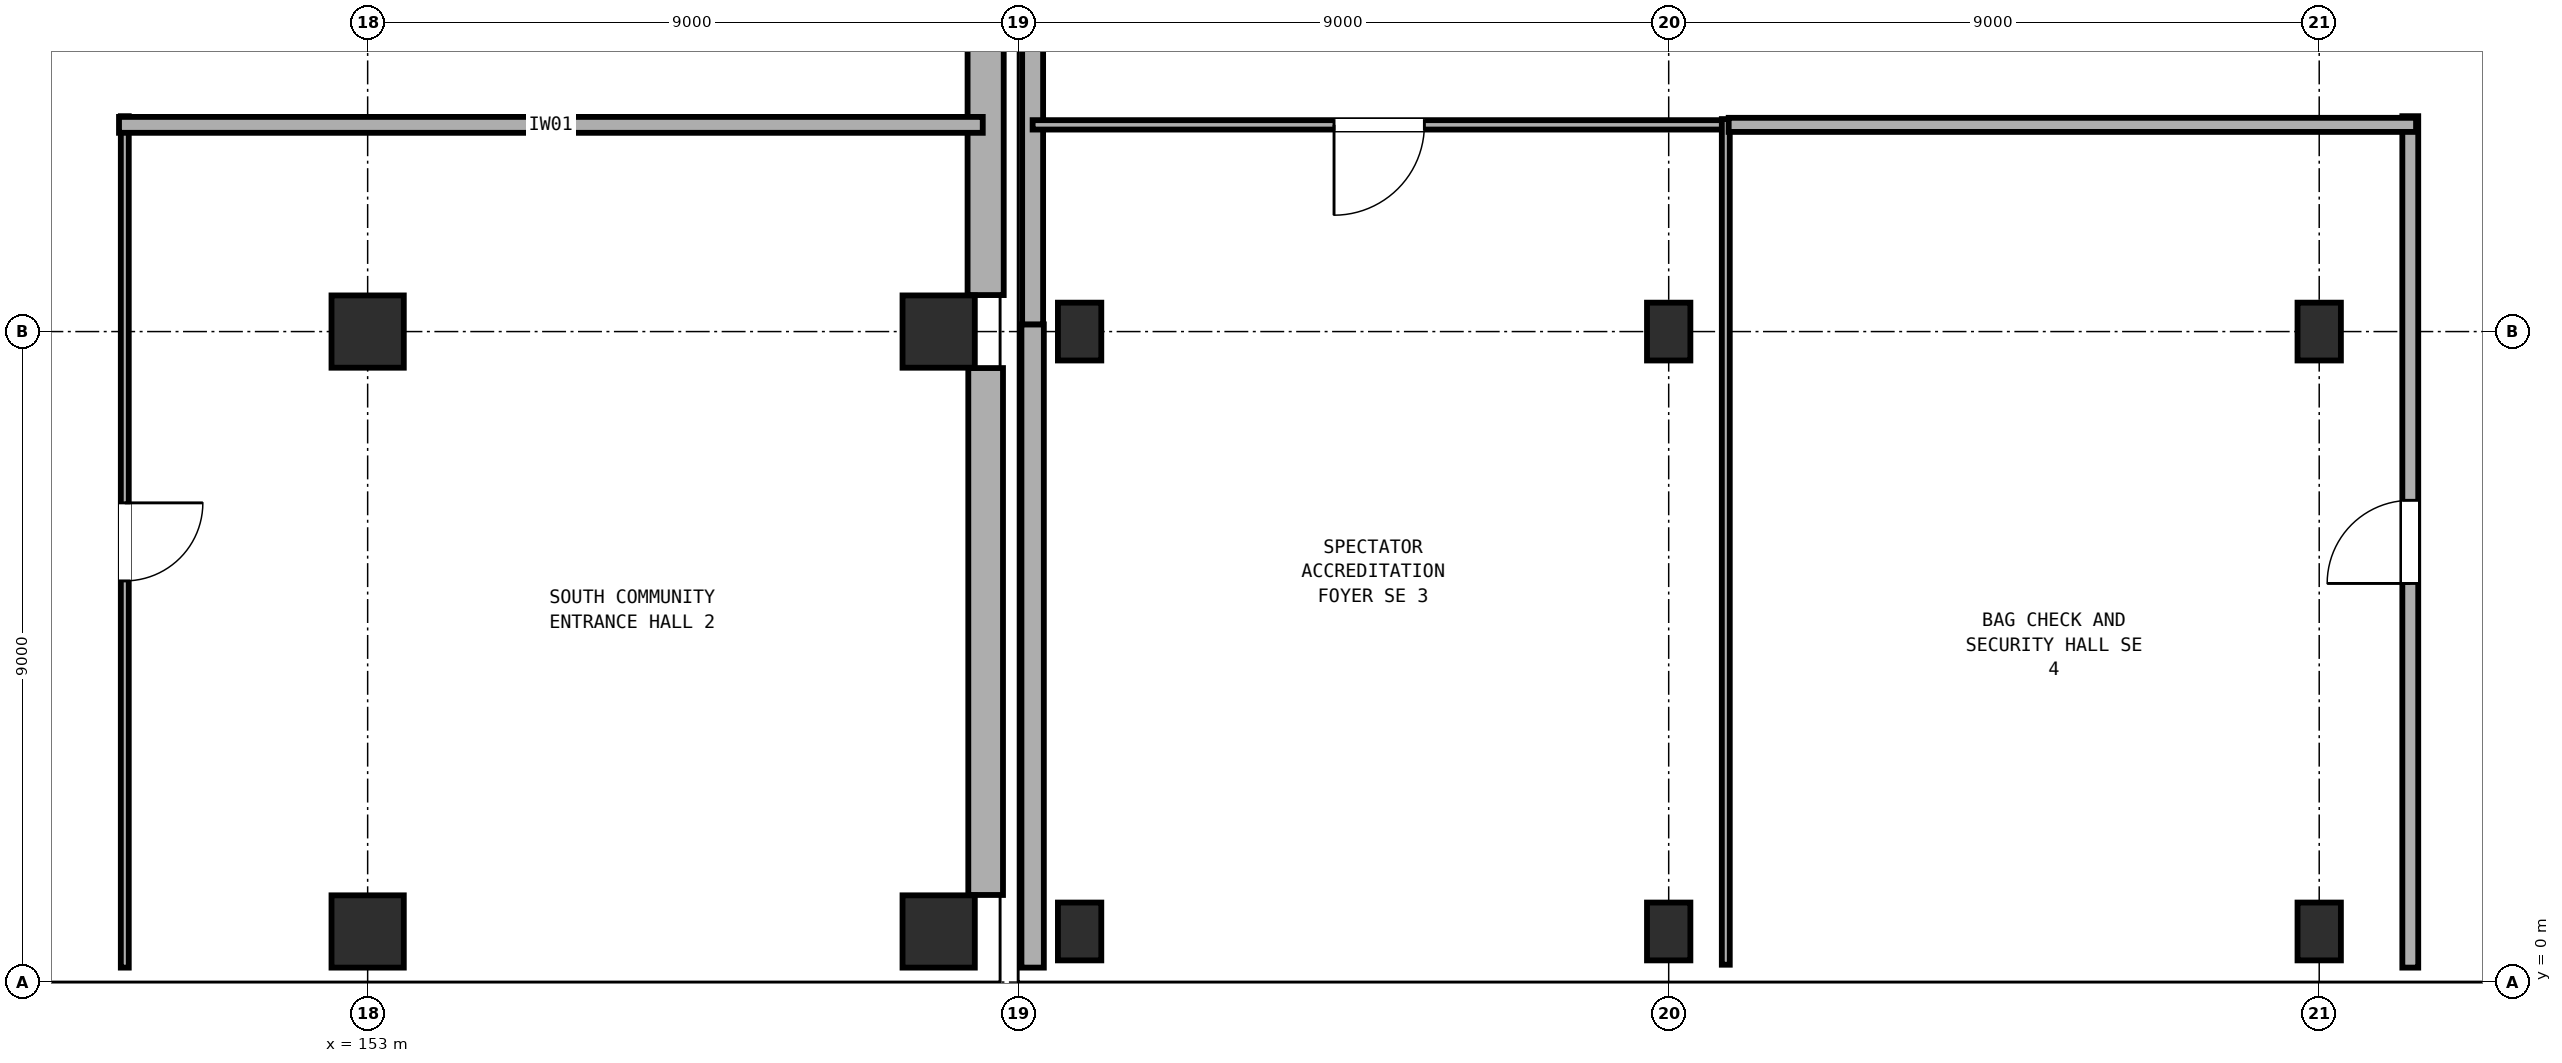
"""IFC4 building model, lengths in metres.
Left out: names, types, materials, properties, quantities, classifications, styles, units other than length and angle.
Written with IfcOpenShell. Run it as: python <this file> out.ifc"""

import sys

from ifc_helpers import new_model, si_unit, direction, frame, frame_2d, origin, origin_2d, place, context, subcontext, project, spatial, rectangle, extrude, element, fill, save


model = new_model("IFC4")
c1 = context("Model", 3, precision=1e-05, world=origin(), true_north=direction((0.0, 1.0)))
c2 = subcontext(c1, "Body", "Model", "MODEL_VIEW")
j1 = project(units=[si_unit("LENGTHUNIT", "METRE"), si_unit("PLANEANGLEUNIT", "RADIAN")], contexts=[c1])
p1 = place(None, origin())
s1 = spatial("IfcSite", under=j1, at=p1, CompositionType="ELEMENT")
p2 = place(p1, origin())
s2 = spatial("IfcBuilding", under=s1, at=p2, CompositionType="ELEMENT")
p3 = place(p2, origin())
s3 = spatial("IfcBuildingStorey", under=s2, at=p3, CompositionType="ELEMENT", Elevation=0.0)
for number, where, z_axis, x_axis in (
    (1, (153.0, 0.7, 0.0), (0.0, 0.0, 1.0), (1.0, 0.0, 0.0)),
    (2, (153.0, 9.0, 0.0), (0.0, 0.0, 1.0), (1.0, 0.0, 0.0)),
    (3, (160.9, 0.7, 0.0), (0.0, 0.0, 1.0), (1.0, 0.0, 0.0)),
    (4, (160.9, 9.0, 0.0), (0.0, 0.0, 1.0), (1.0, 0.0, 0.0)),
):
    element("IfcColumn", number, at=place(p3, frame(where, z_axis=z_axis, x_axis=x_axis)), inside=s3, PredefinedType="COLUMN", context=c2, shape_type="SweptSolid", body=[
        extrude(rectangle(XDim=1.0, YDim=1.0, at=origin_2d()), origin(), (0.0, 0.0, 1.0), 4.8),
    ])
for number, where, z_axis, x_axis in (
    (5, (162.85, 0.7, 0.0), (0.0, 0.0, 1.0), (1.0, 0.0, 0.0)),
    (6, (162.85, 9.0, 0.0), (0.0, 0.0, 1.0), (1.0, 0.0, 0.0)),
    (7, (171.0, 0.7, 0.0), (0.0, 0.0, 1.0), (1.0, 0.0, 0.0)),
    (8, (171.0, 9.0, 0.0), (0.0, 0.0, 1.0), (1.0, 0.0, 0.0)),
    (9, (180.0, 0.7, 0.0), (0.0, 0.0, 1.0), (1.0, 0.0, 0.0)),
    (10, (180.0, 9.0, 0.0), (0.0, 0.0, 1.0), (1.0, 0.0, 0.0)),
):
    element("IfcColumn", number, at=place(p3, frame(where, z_axis=z_axis, x_axis=x_axis)), inside=s3, PredefinedType="COLUMN", context=c2, shape_type="SweptSolid", body=[
        extrude(rectangle(XDim=0.6, YDim=0.8, at=origin_2d()), origin(), (0.0, 0.0, 1.0), 4.8),
    ])
p4 = place(p3, frame((161.55, 17.495, 0.0), z_axis=(0.0, 0.0, 1.0), x_axis=(0.0, -1.0, 0.0)))
e11 = element("IfcWall", 11, at=p4, inside=s3, PredefinedType="SOLIDWALL", context=c2, shape_type="SweptSolid", body=[
    extrude(rectangle(XDim=7.99, YDim=0.5, at=frame_2d((3.995, 0.0))), origin(), (0.0, 0.0, 1.0), 3.28),
])
p5 = place(p3, frame((161.55, 8.495, 0.0), z_axis=(0.0, 0.0, 1.0), x_axis=(0.0, -1.0, 0.0)))
e12 = element("IfcWall", 12, at=p5, inside=s3, PredefinedType="SOLIDWALL", context=c2, shape_type="SweptSolid", body=[
    extrude(rectangle(XDim=7.29, YDim=0.48, at=frame_2d((3.645, 0.0))), origin(), (0.0, 0.0, 1.0), 3.28),
])
p6 = place(p3, frame((160.395, 0.2, 0.0), z_axis=(0.0, 0.0, 1.0), x_axis=(-1.0, 0.0, 0.0)))
e13 = element("IfcWall", 13, at=p6, inside=s3, PredefinedType="SOLIDWALL", context=c2, shape_type="SweptSolid", body=[
    extrude(rectangle(XDim=6.89, YDim=0.31, at=frame_2d((3.445, 0.0))), origin(), (0.0, 0.0, 1.0), 3.58),
])
p7 = place(p6, frame((1.895, 0.0, 0.0)))
e14 = element("IfcOpeningElement", 14, at=p7, cuts=e13, PredefinedType="OPENING", context=c2, shape_type="SweptSolid", body=[
    extrude(rectangle(XDim=3.1, YDim=2.5, at=frame_2d((1.55, 1.25))), frame((0.0, 0.165, 0.0), z_axis=(0.0, -1.0, 0.0), x_axis=(1.0, 0.0, 0.0)), (0.0, 0.0, 1.0), 0.33),
])
p8 = place(p3, frame((152.495, 0.2, 0.0), z_axis=(0.0, 0.0, 1.0), x_axis=(-1.0, 0.0, 0.0)))
e15 = element("IfcWall", 15, at=p8, inside=s3, PredefinedType="SOLIDWALL", context=c2, shape_type="SweptSolid", body=[
    extrude(rectangle(XDim=7.99, YDim=0.29, at=frame_2d((3.995, 0.0))), origin(), (0.0, 0.0, 1.0), 3.58),
])
p9 = place(p8, frame((3.295, 0.0, 0.0)))
e16 = element("IfcOpeningElement", 16, at=p9, cuts=e15, PredefinedType="OPENING", context=c2, shape_type="SweptSolid", body=[
    extrude(rectangle(XDim=3.6, YDim=2.6, at=frame_2d((1.8, 1.3))), frame((0.0, 0.155, 0.0), z_axis=(0.0, -1.0, 0.0), x_axis=(1.0, 0.0, 0.0)), (0.0, 0.0, 1.0), 0.31),
])
p10 = place(p3, frame((162.2, 0.2, 0.0), z_axis=(0.0, 0.0, 1.0), x_axis=(0.0, 1.0, 0.0)))
e17 = element("IfcWall", 17, at=p10, inside=s3, PredefinedType="SOLIDWALL", context=c2, shape_type="SweptSolid", body=[
    extrude(rectangle(XDim=8.9, YDim=0.31, at=frame_2d((4.45, 0.0))), origin(), (0.0, 0.0, 1.0), 3.28),
])
p11 = place(p3, frame((162.2, 9.1, 0.0), z_axis=(0.0, 0.0, 1.0), x_axis=(0.0, 1.0, 0.0)))
e18 = element("IfcWall", 18, at=p11, inside=s3, PredefinedType="SOLIDWALL", context=c2, shape_type="SweptSolid", body=[
    extrude(rectangle(XDim=8.9, YDim=0.29, at=frame_2d((4.45, 0.0))), origin(), (0.0, 0.0, 1.0), 3.28),
])
p12 = place(p3, frame((188.695, 0.2, 0.0), z_axis=(0.0, 0.0, 1.0), x_axis=(-1.0, 0.0, 0.0)))
e19 = element("IfcWall", 19, at=p12, inside=s3, PredefinedType="SOLIDWALL", context=c2, shape_type="SweptSolid", body=[
    extrude(rectangle(XDim=8.39, YDim=0.29, at=frame_2d((4.195, 0.0))), origin(), (0.0, 0.0, 1.0), 3.58),
])
p13 = place(p12, frame((3.545, 0.0, 0.0)))
e20 = element("IfcOpeningElement", 20, at=p13, cuts=e19, PredefinedType="OPENING", context=c2, shape_type="SweptSolid", body=[
    extrude(rectangle(XDim=3.3, YDim=2.55, at=frame_2d((1.65, 1.275))), frame((0.0, 0.155, 0.0), z_axis=(0.0, -1.0, 0.0), x_axis=(1.0, 0.0, 0.0)), (0.0, 0.0, 1.0), 0.31),
])
p14 = place(p3, frame((179.695, 0.2, 0.0), z_axis=(0.0, 0.0, 1.0), x_axis=(-1.0, 0.0, 0.0)))
e21 = element("IfcWall", 21, at=p14, inside=s3, PredefinedType="SOLIDWALL", context=c2, shape_type="SweptSolid", body=[
    extrude(rectangle(XDim=8.39, YDim=0.5, at=frame_2d((4.195, 0.0))), origin(), (0.0, 0.0, 1.0), 3.28),
])
p15 = place(p14, frame((2.895, 0.0, 0.0)))
e22 = element("IfcOpeningElement", 22, at=p15, cuts=e21, PredefinedType="OPENING", context=c2, shape_type="SweptSolid", body=[
    extrude(rectangle(XDim=2.6, YDim=2.35, at=frame_2d((1.3, 1.175))), frame((0.0, 0.26, 0.0), z_axis=(0.0, -1.0, 0.0), x_axis=(1.0, 0.0, 0.0)), (0.0, 0.0, 1.0), 0.52),
])
p16 = place(p3, frame((170.695, 0.2, 0.0), z_axis=(0.0, 0.0, 1.0), x_axis=(-1.0, 0.0, 0.0)))
e23 = element("IfcWall", 23, at=p16, inside=s3, PredefinedType="SOLIDWALL", context=c2, shape_type="SweptSolid", body=[
    extrude(rectangle(XDim=7.54, YDim=0.48, at=frame_2d((3.77, 0.0))), origin(), (0.0, 0.0, 1.0), 3.28),
])
p17 = place(p16, frame((2.52, 0.0, 0.0)))
e24 = element("IfcOpeningElement", 24, at=p17, cuts=e23, PredefinedType="OPENING", context=c2, shape_type="SweptSolid", body=[
    extrude(rectangle(XDim=2.5, YDim=2.35, at=frame_2d((1.25, 1.175))), frame((0.0, 0.25, 0.0), z_axis=(0.0, -1.0, 0.0), x_axis=(1.0, 0.0, 0.0)), (0.0, 0.0, 1.0), 0.5),
])
p18 = place(p3, frame((149.64, 11.98, 0.0), z_axis=(0.0, 0.0, 1.0), x_axis=(0.0, -1.0, 0.0)))
e25 = element("IfcWall", 25, at=p18, inside=s3, PredefinedType="PARTITIONING", context=c2, shape_type="SweptSolid", body=[
    extrude(rectangle(XDim=11.78, YDim=0.11, at=frame_2d((5.89, 0.0))), origin(), (0.0, 0.0, 1.0), 3.28),
])
p19 = place(p18, frame((5.35, 0.0, 0.0)))
e26 = element("IfcOpeningElement", 26, at=p19, cuts=e25, PredefinedType="OPENING", context=c2, shape_type="SweptSolid", body=[
    extrude(rectangle(XDim=1.08, YDim=2.18, at=frame_2d((0.54, 1.09))), frame((0.0, 0.065, 0.0), z_axis=(0.0, -1.0, 0.0), x_axis=(1.0, 0.0, 0.0)), (0.0, 0.0, 1.0), 0.13),
])
p20 = place(p3, frame((149.56, 11.86, 0.0), z_axis=(0.0, 0.0, 1.0), x_axis=(1.0, 0.0, 0.0)))
e27 = element("IfcWall", 27, at=p20, inside=s3, PredefinedType="PARTITIONING", context=c2, shape_type="SweptSolid", body=[
    extrude(rectangle(XDim=11.95, YDim=0.22, at=frame_2d((5.975, 0.0))), origin(), (0.0, 0.0, 1.0), 3.28),
])
p21 = place(p3, frame((171.79, 11.86, 0.0), z_axis=(0.0, 0.0, 1.0), x_axis=(-1.0, 0.0, 0.0)))
e28 = element("IfcWall", 28, at=p21, inside=s3, PredefinedType="PARTITIONING", context=c2, shape_type="SweptSolid", body=[
    extrude(rectangle(XDim=9.59, YDim=0.13, at=frame_2d((4.795, 0.0))), origin(), (0.0, 0.0, 1.0), 3.28),
])
p22 = place(p21, frame((4.17, 0.0, 0.0)))
e29 = element("IfcOpeningElement", 29, at=p22, cuts=e28, PredefinedType="OPENING", context=c2, shape_type="SweptSolid", body=[
    extrude(rectangle(XDim=1.25, YDim=2.15, at=frame_2d((0.625, 1.075))), frame((0.0, 0.075, 0.0), z_axis=(0.0, -1.0, 0.0), x_axis=(1.0, 0.0, 0.0)), (0.0, 0.0, 1.0), 0.15),
])
p23 = place(p3, frame((171.79, 11.94, 0.0), z_axis=(0.0, 0.0, 1.0), x_axis=(0.0, -1.0, 0.0)))
e30 = element("IfcWall", 30, at=p23, inside=s3, PredefinedType="PARTITIONING", context=c2, shape_type="SweptSolid", body=[
    extrude(rectangle(XDim=11.7, YDim=0.11, at=frame_2d((5.85, 0.0))), origin(), (0.0, 0.0, 1.0), 3.28),
])
p24 = place(p3, frame((181.26, 0.2, 0.0), z_axis=(0.0, 0.0, 1.0), x_axis=(0.0, 1.0, 0.0)))
e31 = element("IfcWall", 31, at=p24, inside=s3, PredefinedType="PARTITIONING", context=c2, shape_type="SweptSolid", body=[
    extrude(rectangle(XDim=11.78, YDim=0.22, at=frame_2d((5.89, 0.0))), origin(), (0.0, 0.0, 1.0), 3.28),
])
p25 = place(p24, frame((5.315, 0.0, 0.0)))
e32 = element("IfcOpeningElement", 32, at=p25, cuts=e31, PredefinedType="OPENING", context=c2, shape_type="SweptSolid", body=[
    extrude(rectangle(XDim=1.15, YDim=2.15, at=frame_2d((0.575, 1.075))), frame((0.0, 0.12, 0.0), z_axis=(0.0, -1.0, 0.0), x_axis=(1.0, 0.0, 0.0)), (0.0, 0.0, 1.0), 0.24),
])
p26 = place(p3, frame((171.83, 11.86, 0.0), z_axis=(0.0, 0.0, 1.0), x_axis=(1.0, 0.0, 0.0)))
e33 = element("IfcWall", 33, at=p26, inside=s3, PredefinedType="PARTITIONING", context=c2, shape_type="SweptSolid", body=[
    extrude(rectangle(XDim=9.51, YDim=0.195, at=frame_2d((4.755, 0.0))), origin(), (0.0, 0.0, 1.0), 3.28),
])
p27 = place(p9, origin())
e34 = element("IfcDoor", 34, at=p27, inside=s3, OperationType="DOUBLE_DOOR_SINGLE_SWING", PredefinedType="DOOR", context=c2, shape_type="SweptSolid", body=[
    extrude(rectangle(XDim=3.6, YDim=2.6, at=frame_2d((1.8, 1.3))), frame((0.0, 0.025, 0.0), z_axis=(0.0, -1.0, 0.0), x_axis=(1.0, 0.0, 0.0)), (0.0, 0.0, 1.0), 0.05),
])
fill(e16, e34)
p28 = place(p13, origin())
e35 = element("IfcDoor", 35, at=p28, inside=s3, OperationType="DOUBLE_DOOR_SINGLE_SWING", PredefinedType="DOOR", context=c2, shape_type="SweptSolid", body=[
    extrude(rectangle(XDim=3.3, YDim=2.55, at=frame_2d((1.65, 1.275))), frame((0.0, 0.025, 0.0), z_axis=(0.0, -1.0, 0.0), x_axis=(1.0, 0.0, 0.0)), (0.0, 0.0, 1.0), 0.05),
])
fill(e20, e35)
p29 = place(p7, origin())
e36 = element("IfcDoor", 36, at=p29, inside=s3, OperationType="DOUBLE_DOOR_SINGLE_SWING", PredefinedType="DOOR", context=c2, shape_type="SweptSolid", body=[
    extrude(rectangle(XDim=3.1, YDim=2.5, at=frame_2d((1.55, 1.25))), frame((0.0, 0.025, 0.0), z_axis=(0.0, -1.0, 0.0), x_axis=(1.0, 0.0, 0.0)), (0.0, 0.0, 1.0), 0.05),
])
fill(e14, e36)
p30 = place(p15, origin())
e37 = element("IfcDoor", 37, at=p30, inside=s3, OperationType="DOUBLE_DOOR_SINGLE_SWING", PredefinedType="DOOR", context=c2, shape_type="SweptSolid", body=[
    extrude(rectangle(XDim=2.6, YDim=2.35, at=frame_2d((1.3, 1.175))), frame((0.0, 0.025, 0.0), z_axis=(0.0, -1.0, 0.0), x_axis=(1.0, 0.0, 0.0)), (0.0, 0.0, 1.0), 0.05),
])
fill(e22, e37)
p31 = place(p17, origin())
e38 = element("IfcDoor", 38, at=p31, inside=s3, OperationType="DOUBLE_DOOR_SINGLE_SWING", PredefinedType="DOOR", context=c2, shape_type="SweptSolid", body=[
    extrude(rectangle(XDim=2.5, YDim=2.35, at=frame_2d((1.25, 1.175))), frame((0.0, 0.025, 0.0), z_axis=(0.0, -1.0, 0.0), x_axis=(1.0, 0.0, 0.0)), (0.0, 0.0, 1.0), 0.05),
])
fill(e24, e38)
p32 = place(p19, origin())
e39 = element("IfcDoor", 39, at=p32, inside=s3, OperationType="SINGLE_SWING_LEFT", PredefinedType="DOOR", context=c2, shape_type="SweptSolid", body=[
    extrude(rectangle(XDim=1.08, YDim=2.18, at=frame_2d((0.54, 1.09))), frame((0.0, 0.025, 0.0), z_axis=(0.0, -1.0, 0.0), x_axis=(1.0, 0.0, 0.0)), (0.0, 0.0, 1.0), 0.05),
])
fill(e26, e39)
p33 = place(p22, origin())
e40 = element("IfcDoor", 40, at=p33, inside=s3, OperationType="SINGLE_SWING_RIGHT", PredefinedType="DOOR", context=c2, shape_type="SweptSolid", body=[
    extrude(rectangle(XDim=1.25, YDim=2.15, at=frame_2d((0.625, 1.075))), frame((0.0, 0.025, 0.0), z_axis=(0.0, -1.0, 0.0), x_axis=(1.0, 0.0, 0.0)), (0.0, 0.0, 1.0), 0.05),
])
fill(e29, e40)
p34 = place(p25, origin())
e41 = element("IfcDoor", 41, at=p34, inside=s3, OperationType="SINGLE_SWING_LEFT", PredefinedType="DOOR", context=c2, shape_type="SweptSolid", body=[
    extrude(rectangle(XDim=1.15, YDim=2.15, at=frame_2d((0.575, 1.075))), frame((0.0, 0.025, 0.0), z_axis=(0.0, -1.0, 0.0), x_axis=(1.0, 0.0, 0.0)), (0.0, 0.0, 1.0), 0.05),
])
fill(e32, e41)
save(model, sys.argv[1])
